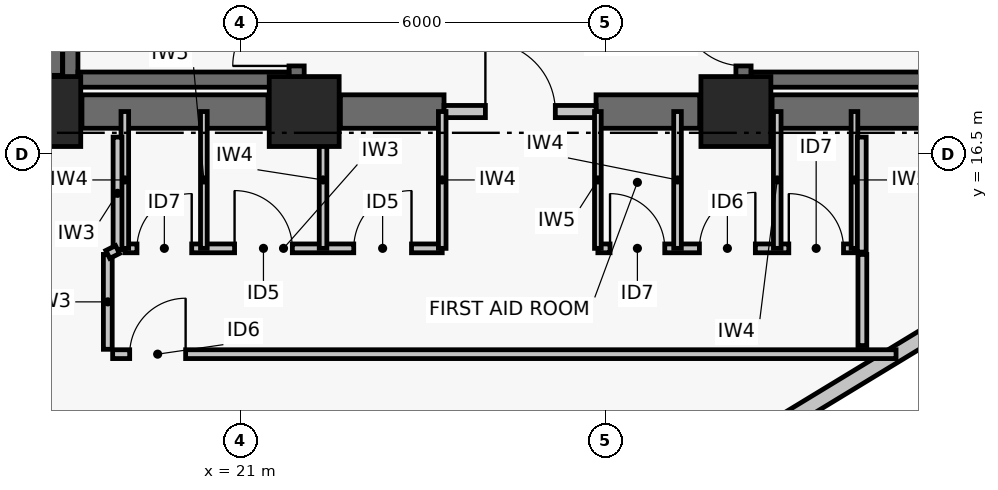
"""IFC4 building model, lengths in metres.
Left out: names, types, materials, properties, quantities, classifications, styles, units other than length and angle.
Written with IfcOpenShell. Run it as: python <this file> out.ifc"""

import sys

from ifc_helpers import new_model, si_unit, direction, frame, frame_2d, origin, origin_2d, place, context, subcontext, project, spatial, rectangle, extrude, element, fill, save


model = new_model("IFC4")
c1 = context("Model", 3, precision=1e-05, world=origin(), true_north=direction((0.0, 1.0)))
c2 = subcontext(c1, "Body", "Model", "MODEL_VIEW")
j1 = project(units=[si_unit("LENGTHUNIT", "METRE"), si_unit("PLANEANGLEUNIT", "RADIAN")], contexts=[c1])
p1 = place(None, origin())
s1 = spatial("IfcSite", under=j1, at=p1, CompositionType="ELEMENT")
p2 = place(p1, origin())
s2 = spatial("IfcBuilding", under=s1, at=p2, CompositionType="ELEMENT")
p3 = place(p2, frame((0.0, 0.0, 115.14)))
s3 = spatial("IfcBuildingStorey", under=s2, at=p3, CompositionType="ELEMENT", Elevation=115.14)
for number, where, z_axis, x_axis in (
    (1, (17.8, 17.2, 0.0), (0.0, 0.0, 1.0), (1.0, 0.0, 0.0)),
    (2, (22.05, 17.2, 0.0), (0.0, 0.0, 1.0), (1.0, 0.0, 0.0)),
    (3, (29.15, 17.2, 0.0), (0.0, 0.0, 1.0), (1.0, 0.0, 0.0)),
):
    element("IfcColumn", number, at=place(p3, frame(where, z_axis=z_axis, x_axis=x_axis)), inside=s3, PredefinedType="COLUMN", context=c2, shape_type="SweptSolid", body=[
        extrude(rectangle(XDim=1.15, YDim=1.15, at=origin_2d()), origin(), (0.0, 0.0, 1.0), 3.72),
    ])
p4 = place(p3, frame((18.395, 17.2, 0.0), z_axis=(0.0, 0.0, 1.0), x_axis=(1.0, 0.0, 0.0)))
e4 = element("IfcWall", 4, at=p4, inside=s3, PredefinedType="SHEAR", context=c2, shape_type="SweptSolid", body=[
    extrude(rectangle(XDim=3.06, YDim=0.55, at=frame_2d((1.53, 0.0))), origin(), (0.0, 0.0, 1.0), 3.44),
])
p5 = place(p3, frame((22.645, 17.2, 0.0), z_axis=(0.0, 0.0, 1.0), x_axis=(1.0, 0.0, 0.0)))
e5 = element("IfcWall", 5, at=p5, inside=s3, PredefinedType="SHEAR", context=c2, shape_type="SweptSolid", body=[
    extrude(rectangle(XDim=1.705, YDim=0.55, at=frame_2d((0.853, 0.0))), origin(), (0.0, 0.0, 1.0), 3.44),
])
p6 = place(p3, frame((26.85, 17.2, 0.0), z_axis=(0.0, 0.0, 1.0), x_axis=(1.0, 0.0, 0.0)))
e6 = element("IfcWall", 6, at=p6, inside=s3, PredefinedType="SHEAR", context=c2, shape_type="SweptSolid", body=[
    extrude(rectangle(XDim=1.705, YDim=0.55, at=frame_2d((0.853, 0.0))), origin(), (0.0, 0.0, 1.0), 3.44),
])
p7 = place(p3, frame((29.745, 17.2, 0.0), z_axis=(0.0, 0.0, 1.0), x_axis=(1.0, 0.0, 0.0)))
e7 = element("IfcWall", 7, at=p7, inside=s3, PredefinedType="SHEAR", context=c2, shape_type="SweptSolid", body=[
    extrude(rectangle(XDim=3.06, YDim=0.55, at=frame_2d((1.53, 0.0))), origin(), (0.0, 0.0, 1.0), 3.44),
])
p8 = place(p3, frame((17.8, 17.795, 0.0), z_axis=(0.0, 0.0, 1.0), x_axis=(0.0, 1.0, 0.0)))
e8 = element("IfcWall", 8, at=p8, inside=s3, PredefinedType="SHEAR", context=c2, shape_type="SweptSolid", body=[
    extrude(rectangle(XDim=8.41, YDim=0.55, at=frame_2d((4.205, 0.0))), origin(), (0.0, 0.0, 1.0), 3.44),
])
p9 = place(p3, frame((18.204, 17.6, 0.0), z_axis=(0.0, 0.0, 1.0), x_axis=(0.0, 1.0, 0.0)))
e9 = element("IfcWall", 9, at=p9, inside=s3, PredefinedType="SHEAR", context=c2, shape_type="SweptSolid", body=[
    extrude(rectangle(XDim=8.8, YDim=0.25, at=frame_2d((4.4, 0.0))), origin(), (0.0, 0.0, 1.0), 3.44),
])
p10 = place(p3, frame((21.925, 17.6, 0.0), z_axis=(0.0, 0.0, 1.0), x_axis=(0.0, 1.0, 0.0)))
e10 = element("IfcWall", 10, at=p10, inside=s3, PredefinedType="SHEAR", context=c2, shape_type="SweptSolid", body=[
    extrude(rectangle(XDim=8.8, YDim=0.25, at=frame_2d((4.4, 0.0))), origin(), (0.0, 0.0, 1.0), 3.44),
])
p11 = place(p10, frame((0.35, 0.0, 0.0)))
e11 = element("IfcOpeningElement", 11, at=p11, cuts=e10, PredefinedType="OPENING", context=c2, shape_type="SweptSolid", body=[
    extrude(rectangle(XDim=1.05, YDim=2.08, at=frame_2d((0.525, 1.04))), frame((0.0, 0.135, 0.0), z_axis=(0.0, -1.0, 0.0), x_axis=(1.0, 0.0, 0.0)), (0.0, 0.0, 1.0), 0.27),
])
p12 = place(p3, frame((18.329, 17.725, 0.0), z_axis=(0.0, 0.0, 1.0), x_axis=(1.0, 0.0, 0.0)))
e12 = element("IfcWall", 12, at=p12, inside=s3, PredefinedType="SHEAR", context=c2, shape_type="SweptSolid", body=[
    extrude(rectangle(XDim=3.471, YDim=0.25, at=frame_2d((1.735, 0.0))), origin(), (0.0, 0.0, 1.0), 3.44),
])
p13 = place(p3, frame((29.275, 17.6, 0.0), z_axis=(0.0, 0.0, 1.0), x_axis=(0.0, 1.0, 0.0)))
e13 = element("IfcWall", 13, at=p13, inside=s3, PredefinedType="SHEAR", context=c2, shape_type="SweptSolid", body=[
    extrude(rectangle(XDim=8.8, YDim=0.25, at=frame_2d((4.4, 0.0))), origin(), (0.0, 0.0, 1.0), 3.44),
])
p14 = place(p13, frame((0.35, 0.0, 0.0)))
e14 = element("IfcOpeningElement", 14, at=p14, cuts=e13, PredefinedType="OPENING", context=c2, shape_type="SweptSolid", body=[
    extrude(rectangle(XDim=1.05, YDim=2.08, at=frame_2d((0.525, 1.04))), frame((0.0, 0.135, 0.0), z_axis=(0.0, -1.0, 0.0), x_axis=(1.0, 0.0, 0.0)), (0.0, 0.0, 1.0), 0.27),
])
p15 = place(p3, frame((29.4, 17.725, 0.0), z_axis=(0.0, 0.0, 1.0), x_axis=(1.0, 0.0, 0.0)))
e15 = element("IfcWall", 15, at=p15, inside=s3, PredefinedType="SHEAR", context=c2, shape_type="SweptSolid", body=[
    extrude(rectangle(XDim=3.471, YDim=0.25, at=frame_2d((1.736, 0.0))), origin(), (0.0, 0.0, 1.0), 3.44),
])
p16 = place(p3, frame((35.48, 15.455, 0.0), z_axis=(0.0, 0.0, 1.0), x_axis=(-0.854673977685, -0.51916509115, 0.0)))
e16 = element("IfcWall", 16, at=p16, inside=s3, PredefinedType="PARTITIONING", context=c2, shape_type="SweptSolid", body=[
    extrude(rectangle(XDim=6.678, YDim=0.26, at=frame_2d((3.339, 0.0))), origin(), (0.0, 0.0, 1.0), 3.44),
])
p17 = place(p3, frame((24.35, 17.2, 0.0), z_axis=(0.0, 0.0, 1.0), x_axis=(1.0, 0.0, 0.0)))
e17 = element("IfcWall", 17, at=p17, inside=s3, PredefinedType="PARTITIONING", context=c2, shape_type="SweptSolid", body=[
    extrude(rectangle(XDim=2.5, YDim=0.2, at=frame_2d((1.25, 0.0))), origin(), (0.0, 0.0, 1.0), 2.57),
])
p18 = place(p17, frame((0.68, 0.0, 0.0)))
e18 = element("IfcOpeningElement", 18, at=p18, cuts=e17, PredefinedType="OPENING", context=c2, shape_type="SweptSolid", body=[
    extrude(rectangle(XDim=1.15, YDim=2.08, at=frame_2d((0.575, 1.04))), frame((0.0, 0.11, 0.0), z_axis=(0.0, -1.0, 0.0), x_axis=(1.0, 0.0, 0.0)), (0.0, 0.0, 1.0), 0.22),
])
p19 = place(p3, frame((19.1, 14.95, 0.0), z_axis=(0.0, 0.0, 1.0), x_axis=(1.0, 0.0, 0.0)))
e19 = element("IfcWall", 19, at=p19, inside=s3, PredefinedType="PARTITIONING", context=c2, shape_type="SweptSolid", body=[
    extrude(rectangle(XDim=5.22, YDim=0.145, at=frame_2d((2.61, 0.0))), origin(), (0.0, 0.0, 1.0), 2.62),
])
p20 = place(p19, frame((0.2, 0.0, 0.0)))
e20 = element("IfcOpeningElement", 20, at=p20, cuts=e19, PredefinedType="OPENING", context=c2, shape_type="SweptSolid", body=[
    extrude(rectangle(XDim=0.9, YDim=2.02, at=frame_2d((0.45, 1.01))), frame((0.0, 0.083, 0.0), z_axis=(0.0, -1.0, 0.0), x_axis=(1.0, 0.0, 0.0)), (0.0, 0.0, 1.0), 0.165),
])
p21 = place(p19, frame((1.805, 0.0, 0.0)))
e21 = element("IfcOpeningElement", 21, at=p21, cuts=e19, PredefinedType="OPENING", context=c2, shape_type="SweptSolid", body=[
    extrude(rectangle(XDim=0.95, YDim=2.06, at=frame_2d((0.475, 1.03))), frame((0.0, 0.083, 0.0), z_axis=(0.0, -1.0, 0.0), x_axis=(1.0, 0.0, 0.0)), (0.0, 0.0, 1.0), 0.165),
])
p22 = place(p19, frame((3.765, 0.0, 0.0)))
e22 = element("IfcOpeningElement", 22, at=p22, cuts=e19, PredefinedType="OPENING", context=c2, shape_type="SweptSolid", body=[
    extrude(rectangle(XDim=0.95, YDim=2.06, at=frame_2d((0.475, 1.03))), frame((0.0, 0.083, 0.0), z_axis=(0.0, -1.0, 0.0), x_axis=(1.0, 0.0, 0.0)), (0.0, 0.0, 1.0), 0.165),
])
p23 = place(p3, frame((26.88, 14.95, 0.0), z_axis=(0.0, 0.0, 1.0), x_axis=(1.0, 0.0, 0.0)))
e23 = element("IfcWall", 23, at=p23, inside=s3, PredefinedType="PARTITIONING", context=c2, shape_type="SweptSolid", body=[
    extrude(rectangle(XDim=4.22, YDim=0.145, at=frame_2d((2.11, 0.0))), origin(), (0.0, 0.0, 1.0), 3.02),
])
p24 = place(p23, frame((0.2, 0.0, 0.0)))
e24 = element("IfcOpeningElement", 24, at=p24, cuts=e23, PredefinedType="OPENING", context=c2, shape_type="SweptSolid", body=[
    extrude(rectangle(XDim=0.9, YDim=2.02, at=frame_2d((0.45, 1.01))), frame((0.0, 0.083, 0.0), z_axis=(0.0, -1.0, 0.0), x_axis=(1.0, 0.0, 0.0)), (0.0, 0.0, 1.0), 0.165),
])
p25 = place(p23, frame((1.67, 0.0, 0.0)))
e25 = element("IfcOpeningElement", 25, at=p25, cuts=e23, PredefinedType="OPENING", context=c2, shape_type="SweptSolid", body=[
    extrude(rectangle(XDim=0.92, YDim=2.05, at=frame_2d((0.46, 1.025))), frame((0.0, 0.083, 0.0), z_axis=(0.0, -1.0, 0.0), x_axis=(1.0, 0.0, 0.0)), (0.0, 0.0, 1.0), 0.165),
])
p26 = place(p23, frame((3.14, 0.0, 0.0)))
e26 = element("IfcOpeningElement", 26, at=p26, cuts=e23, PredefinedType="OPENING", context=c2, shape_type="SweptSolid", body=[
    extrude(rectangle(XDim=0.9, YDim=2.02, at=frame_2d((0.45, 1.01))), frame((0.0, 0.083, 0.0), z_axis=(0.0, -1.0, 0.0), x_axis=(1.0, 0.0, 0.0)), (0.0, 0.0, 1.0), 0.165),
])
p27 = place(p3, frame((19.1, 14.95, 0.0), z_axis=(0.0, 0.0, 1.0), x_axis=(0.0, 1.0, 0.0)))
e27 = element("IfcWall", 27, at=p27, inside=s3, PredefinedType="PARTITIONING", context=c2, shape_type="SweptSolid", body=[
    extrude(rectangle(XDim=2.25, YDim=0.125, at=frame_2d((1.125, 0.0))), origin(), (0.0, 0.0, 1.0), 2.57),
])
p28 = place(p3, frame((20.4, 14.95, 0.0), z_axis=(0.0, 0.0, 1.0), x_axis=(0.0, 1.0, 0.0)))
e28 = element("IfcWall", 28, at=p28, inside=s3, PredefinedType="PARTITIONING", context=c2, shape_type="SweptSolid", body=[
    extrude(rectangle(XDim=2.25, YDim=0.11, at=frame_2d((1.125, 0.0))), origin(), (0.0, 0.0, 1.0), 2.57),
])
for number, where, z_axis, x_axis in (
    (29, (22.36, 14.95, 0.0), (0.0, 0.0, 1.0), (0.0, 1.0, 0.0)),
    (30, (24.32, 14.95, 0.0), (0.0, 0.0, 1.0), (0.0, 1.0, 0.0)),
):
    element("IfcWall", number, at=place(p3, frame(where, z_axis=z_axis, x_axis=x_axis)), inside=s3, PredefinedType="PARTITIONING", context=c2, shape_type="SweptSolid", body=[
        extrude(rectangle(XDim=2.25, YDim=0.125, at=frame_2d((1.125, 0.0))), origin(), (0.0, 0.0, 1.0), 2.57),
    ])
p29 = place(p3, frame((26.88, 14.95, 0.0), z_axis=(0.0, 0.0, 1.0), x_axis=(0.0, 1.0, 0.0)))
e31 = element("IfcWall", 31, at=p29, inside=s3, PredefinedType="PARTITIONING", context=c2, shape_type="SweptSolid", body=[
    extrude(rectangle(XDim=2.25, YDim=0.11, at=frame_2d((1.125, 0.0))), origin(), (0.0, 0.0, 1.0), 2.57),
])
for number, where, z_axis, x_axis in (
    (32, (28.19, 14.95, 0.0), (0.0, 0.0, 1.0), (0.0, 1.0, 0.0)),
    (33, (29.83, 14.95, 0.0), (0.0, 0.0, 1.0), (0.0, 1.0, 0.0)),
):
    element("IfcWall", number, at=place(p3, frame(where, z_axis=z_axis, x_axis=x_axis)), inside=s3, PredefinedType="PARTITIONING", context=c2, shape_type="SweptSolid", body=[
        extrude(rectangle(XDim=2.25, YDim=0.125, at=frame_2d((1.125, 0.0))), origin(), (0.0, 0.0, 1.0), 2.57),
    ])
p30 = place(p3, frame((31.1, 14.95, 0.0), z_axis=(0.0, 0.0, 1.0), x_axis=(0.0, 1.0, 0.0)))
e34 = element("IfcWall", 34, at=p30, inside=s3, PredefinedType="PARTITIONING", context=c2, shape_type="SweptSolid", body=[
    extrude(rectangle(XDim=2.25, YDim=0.11, at=frame_2d((1.125, 0.0))), origin(), (0.0, 0.0, 1.0), 2.57),
])
p31 = place(p3, frame((18.98, 16.78, 0.0), z_axis=(0.0, 0.0, 1.0), x_axis=(0.0, -1.0, 0.0)))
e35 = element("IfcWall", 35, at=p31, inside=s3, PredefinedType="PARTITIONING", context=c2, shape_type="SweptSolid", body=[
    extrude(rectangle(XDim=1.85, YDim=0.145, at=frame_2d((0.925, 0.0))), origin(), (0.0, 0.0, 1.0), 2.57),
])
p32 = place(p3, frame((18.82, 14.85, 0.0), z_axis=(0.0, 0.0, 1.0), x_axis=(0.0, -1.0, 0.0)))
e36 = element("IfcWall", 36, at=p32, inside=s3, PredefinedType="PARTITIONING", context=c2, shape_type="SweptSolid", body=[
    extrude(rectangle(XDim=1.56, YDim=0.145, at=frame_2d((0.78, 0.0))), origin(), (0.0, 0.0, 1.0), 3.02),
])
p33 = place(p3, frame((18.9, 13.21, 0.0), z_axis=(0.0, 0.0, 1.0), x_axis=(1.0, 0.0, 0.0)))
e37 = element("IfcWall", 37, at=p33, inside=s3, PredefinedType="PARTITIONING", context=c2, shape_type="SweptSolid", body=[
    extrude(rectangle(XDim=12.884, YDim=0.145, at=frame_2d((6.442, 0.0))), origin(), (0.0, 0.0, 1.0), 2.62),
])
p34 = place(p33, frame((0.28, 0.0, 0.0)))
e38 = element("IfcOpeningElement", 38, at=p34, cuts=e37, PredefinedType="OPENING", context=c2, shape_type="SweptSolid", body=[
    extrude(rectangle(XDim=0.92, YDim=2.05, at=frame_2d((0.46, 1.025))), frame((0.0, 0.083, 0.0), z_axis=(0.0, -1.0, 0.0), x_axis=(1.0, 0.0, 0.0)), (0.0, 0.0, 1.0), 0.165),
])
p35 = place(p3, frame((31.23, 13.351, 0.0), z_axis=(0.0, 0.0, 1.0), x_axis=(0.0, 1.0, 0.0)))
e39 = element("IfcWall", 39, at=p35, inside=s3, PredefinedType="PARTITIONING", context=c2, shape_type="SweptSolid", body=[
    extrude(rectangle(XDim=1.499, YDim=0.145, at=frame_2d((0.75, 0.0))), origin(), (0.0, 0.0, 1.0), 2.87),
])
p36 = place(p3, frame((31.22, 14.889, 0.0), z_axis=(0.0, 0.0, 1.0), x_axis=(0.0, 1.0, 0.0)))
e40 = element("IfcWall", 40, at=p36, inside=s3, PredefinedType="PARTITIONING", context=c2, shape_type="SweptSolid", body=[
    extrude(rectangle(XDim=1.891, YDim=0.145, at=frame_2d((0.946, 0.0))), origin(), (0.0, 0.0, 1.0), 2.57),
])
p37 = place(p3, frame((18.82, 14.85, 0.0), z_axis=(0.0, 0.0, 1.0), x_axis=(0.89470021502, 0.446667130247, 0.0)))
e41 = element("IfcWall", 41, at=p37, inside=s3, PredefinedType="PARTITIONING", context=c2, shape_type="SweptSolid", body=[
    extrude(rectangle(XDim=0.179, YDim=0.145, at=frame_2d((0.089, 0.0))), origin(), (0.0, 0.0, 1.0), 3.44),
])
p38 = place(p11, origin())
e42 = element("IfcDoor", 42, at=p38, inside=s3, OperationType="SINGLE_SWING_LEFT", PredefinedType="DOOR", context=c2, shape_type="SweptSolid", body=[
    extrude(rectangle(XDim=1.05, YDim=2.08, at=frame_2d((0.525, 1.04))), frame((0.0, 0.025, 0.0), z_axis=(0.0, -1.0, 0.0), x_axis=(1.0, 0.0, 0.0)), (0.0, 0.0, 1.0), 0.05),
])
fill(e11, e42)
p39 = place(p14, origin())
e43 = element("IfcDoor", 43, at=p39, inside=s3, OperationType="SINGLE_SWING_RIGHT", PredefinedType="DOOR", context=c2, shape_type="SweptSolid", body=[
    extrude(rectangle(XDim=1.05, YDim=2.08, at=frame_2d((0.525, 1.04))), frame((0.0, 0.025, 0.0), z_axis=(0.0, -1.0, 0.0), x_axis=(1.0, 0.0, 0.0)), (0.0, 0.0, 1.0), 0.05),
])
fill(e14, e43)
p40 = place(p18, origin())
e44 = element("IfcDoor", 44, at=p40, inside=s3, OperationType="SINGLE_SWING_LEFT", PredefinedType="DOOR", context=c2, shape_type="SweptSolid", body=[
    extrude(rectangle(XDim=1.15, YDim=2.08, at=frame_2d((0.575, 1.04))), frame((0.0, 0.025, 0.0), z_axis=(0.0, -1.0, 0.0), x_axis=(1.0, 0.0, 0.0)), (0.0, 0.0, 1.0), 0.05),
])
fill(e18, e44)
p41 = place(p20, origin())
e45 = element("IfcDoor", 45, at=p41, inside=s3, OperationType="SINGLE_SWING_RIGHT", PredefinedType="DOOR", context=c2, shape_type="SweptSolid", body=[
    extrude(rectangle(XDim=0.9, YDim=2.02, at=frame_2d((0.45, 1.01))), frame((0.0, 0.025, 0.0), z_axis=(0.0, -1.0, 0.0), x_axis=(1.0, 0.0, 0.0)), (0.0, 0.0, 1.0), 0.05),
])
fill(e20, e45)
p42 = place(p21, origin())
e46 = element("IfcDoor", 46, at=p42, inside=s3, OperationType="SINGLE_SWING_LEFT", PredefinedType="DOOR", context=c2, shape_type="SweptSolid", body=[
    extrude(rectangle(XDim=0.95, YDim=2.06, at=frame_2d((0.475, 1.03))), frame((0.0, 0.025, 0.0), z_axis=(0.0, -1.0, 0.0), x_axis=(1.0, 0.0, 0.0)), (0.0, 0.0, 1.0), 0.05),
])
fill(e21, e46)
p43 = place(p22, origin())
e47 = element("IfcDoor", 47, at=p43, inside=s3, OperationType="SINGLE_SWING_RIGHT", PredefinedType="DOOR", context=c2, shape_type="SweptSolid", body=[
    extrude(rectangle(XDim=0.95, YDim=2.06, at=frame_2d((0.475, 1.03))), frame((0.0, 0.025, 0.0), z_axis=(0.0, -1.0, 0.0), x_axis=(1.0, 0.0, 0.0)), (0.0, 0.0, 1.0), 0.05),
])
fill(e22, e47)
p44 = place(p24, origin())
e48 = element("IfcDoor", 48, at=p44, inside=s3, OperationType="SINGLE_SWING_LEFT", PredefinedType="DOOR", context=c2, shape_type="SweptSolid", body=[
    extrude(rectangle(XDim=0.9, YDim=2.02, at=frame_2d((0.45, 1.01))), frame((0.0, 0.025, 0.0), z_axis=(0.0, -1.0, 0.0), x_axis=(1.0, 0.0, 0.0)), (0.0, 0.0, 1.0), 0.05),
])
fill(e24, e48)
p45 = place(p25, origin())
e49 = element("IfcDoor", 49, at=p45, inside=s3, OperationType="SINGLE_SWING_RIGHT", PredefinedType="DOOR", context=c2, shape_type="SweptSolid", body=[
    extrude(rectangle(XDim=0.92, YDim=2.05, at=frame_2d((0.46, 1.025))), frame((0.0, 0.025, 0.0), z_axis=(0.0, -1.0, 0.0), x_axis=(1.0, 0.0, 0.0)), (0.0, 0.0, 1.0), 0.05),
])
fill(e25, e49)
p46 = place(p26, origin())
e50 = element("IfcDoor", 50, at=p46, inside=s3, OperationType="SINGLE_SWING_LEFT", PredefinedType="DOOR", context=c2, shape_type="SweptSolid", body=[
    extrude(rectangle(XDim=0.9, YDim=2.02, at=frame_2d((0.45, 1.01))), frame((0.0, 0.025, 0.0), z_axis=(0.0, -1.0, 0.0), x_axis=(1.0, 0.0, 0.0)), (0.0, 0.0, 1.0), 0.05),
])
fill(e26, e50)
p47 = place(p34, origin())
e51 = element("IfcDoor", 51, at=p47, inside=s3, OperationType="SINGLE_SWING_RIGHT", PredefinedType="DOOR", context=c2, shape_type="SweptSolid", body=[
    extrude(rectangle(XDim=0.92, YDim=2.05, at=frame_2d((0.46, 1.025))), frame((0.0, 0.025, 0.0), z_axis=(0.0, -1.0, 0.0), x_axis=(1.0, 0.0, 0.0)), (0.0, 0.0, 1.0), 0.05),
])
fill(e38, e51)
save(model, sys.argv[1])
